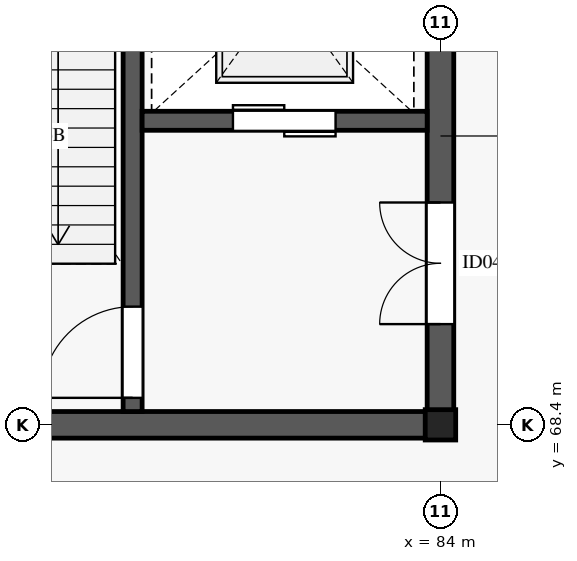
"""IFC4 building model, lengths in metres.
Left out: names, types, materials, properties, quantities, classifications, styles, units other than length and angle.
Written with IfcOpenShell. Run it as: python <this file> out.ifc"""

import sys

from ifc_helpers import new_model, si_unit, direction, frame, frame_2d, origin, origin_2d, place, context, subcontext, project, spatial, rectangle, i_section, extrude, element, fill, save


model = new_model("IFC4")
c1 = context("Model", 3, precision=1e-05, world=origin(), true_north=direction((0.0, 1.0)))
c2 = subcontext(c1, "Body", "Model", "MODEL_VIEW")
j1 = project(units=[si_unit("LENGTHUNIT", "METRE"), si_unit("PLANEANGLEUNIT", "RADIAN")], contexts=[c1])
p1 = place(None, origin())
s1 = spatial("IfcSite", under=j1, at=p1, CompositionType="ELEMENT")
p2 = place(p1, origin())
s2 = spatial("IfcBuilding", under=s1, at=p2, CompositionType="ELEMENT")
p3 = place(p2, origin())
s3 = spatial("IfcBuildingStorey", under=s2, at=p3, CompositionType="ELEMENT", Elevation=0.0)
p4 = place(p3, frame((84.0, 68.4, 0.0), z_axis=(0.0, 0.0, 1.0), x_axis=(1.0, 0.0, 0.0)))
e1 = element("IfcColumn", 1, at=p4, inside=s3, PredefinedType="COLUMN", context=c2, shape_type="SweptSolid", body=[
    extrude(i_section(OverallWidth=0.401, OverallDepth=0.399, WebThickness=0.025, FlangeThickness=0.04, FilletRadius=0.015, at=origin_2d()), origin(), (0.0, 0.0, 1.0), 5.185),
])
p5 = place(p3, frame((75.825, 68.4, 0.0), z_axis=(0.0, 0.0, 1.0), x_axis=(1.0, 0.0, 0.0)))
e2 = element("IfcWall", 2, at=p5, inside=s3, PredefinedType="SHEAR", context=c2, shape_type="SweptSolid", body=[
    extrude(rectangle(XDim=8.35, YDim=0.35, at=frame_2d((4.175, 0.0))), origin(), (0.0, 0.0, 1.0), 5.19),
])
p6 = place(p3, frame((84.0, 68.575, 0.0), z_axis=(0.0, 0.0, 1.0), x_axis=(0.0, 1.0, 0.0)))
e3 = element("IfcWall", 3, at=p6, inside=s3, PredefinedType="SHEAR", context=c2, shape_type="SweptSolid", body=[
    extrude(rectangle(XDim=7.25, YDim=0.35, at=frame_2d((3.625, 0.0))), origin(), (0.0, 0.0, 1.0), 5.19),
])
p7 = place(p6, frame((1.15, 0.0, 0.0)))
e4 = element("IfcOpeningElement", 4, at=p7, cuts=e3, PredefinedType="OPENING", context=c2, shape_type="SweptSolid", body=[
    extrude(rectangle(XDim=1.6, YDim=2.35, at=frame_2d((0.8, 1.175))), frame((0.0, 0.185, 0.0), z_axis=(0.0, -1.0, 0.0), x_axis=(1.0, 0.0, 0.0)), (0.0, 0.0, 1.0), 0.37),
])
p8 = place(p3, frame((79.95, 68.575, 0.0), z_axis=(0.0, 0.0, 1.0), x_axis=(0.0, 1.0, 0.0)))
e5 = element("IfcWall", 5, at=p8, inside=s3, PredefinedType="SHEAR", context=c2, shape_type="SweptSolid", body=[
    extrude(rectangle(XDim=7.25, YDim=0.25, at=frame_2d((3.625, 0.0))), origin(), (0.0, 0.0, 1.0), 5.19),
])
p9 = place(p8, frame((0.18, 0.0, 0.0)))
e6 = element("IfcOpeningElement", 6, at=p9, cuts=e5, PredefinedType="OPENING", context=c2, shape_type="SweptSolid", body=[
    extrude(rectangle(XDim=1.2, YDim=2.2, at=frame_2d((0.6, 1.1))), frame((0.0, 0.135, 0.0), z_axis=(0.0, -1.0, 0.0), x_axis=(1.0, 0.0, 0.0)), (0.0, 0.0, 1.0), 0.27),
])
p10 = place(p3, frame((80.075, 72.4, 0.0), z_axis=(0.0, 0.0, 1.0), x_axis=(1.0, 0.0, 0.0)))
e7 = element("IfcWall", 7, at=p10, inside=s3, PredefinedType="SHEAR", context=c2, shape_type="SweptSolid", body=[
    extrude(rectangle(XDim=3.75, YDim=0.25, at=frame_2d((1.875, 0.0))), origin(), (0.0, 0.0, 1.0), 5.19),
])
p11 = place(p10, frame((1.195, 0.0, 0.0)))
e8 = element("IfcOpeningElement", 8, at=p11, cuts=e7, PredefinedType="OPENING", context=c2, shape_type="SweptSolid", body=[
    extrude(rectangle(XDim=1.35, YDim=2.2, at=frame_2d((0.675, 1.1))), frame((0.0, 0.135, 0.0), z_axis=(0.0, -1.0, 0.0), x_axis=(1.0, 0.0, 0.0)), (0.0, 0.0, 1.0), 0.27),
])
p12 = place(p9, origin())
e9 = element("IfcDoor", 9, at=p12, inside=s3, OperationType="SINGLE_SWING_LEFT", PredefinedType="DOOR", context=c2, shape_type="SweptSolid", body=[
    extrude(rectangle(XDim=1.2, YDim=2.2, at=frame_2d((0.6, 1.1))), frame((0.0, 0.025, 0.0), z_axis=(0.0, -1.0, 0.0), x_axis=(1.0, 0.0, 0.0)), (0.0, 0.0, 1.0), 0.05),
])
fill(e6, e9)
p13 = place(p7, origin())
e10 = element("IfcDoor", 10, at=p13, inside=s3, OperationType="DOUBLE_DOOR_SINGLE_SWING", PredefinedType="DOOR", context=c2, shape_type="SweptSolid", body=[
    extrude(rectangle(XDim=1.6, YDim=2.35, at=frame_2d((0.8, 1.175))), frame((0.0, 0.025, 0.0), z_axis=(0.0, -1.0, 0.0), x_axis=(1.0, 0.0, 0.0)), (0.0, 0.0, 1.0), 0.05),
])
fill(e4, e10)
p14 = place(p11, origin())
e11 = element("IfcDoor", 11, at=p14, inside=s3, OperationType="DOUBLE_DOOR_SLIDING", PredefinedType="DOOR", context=c2, shape_type="SweptSolid", body=[
    extrude(rectangle(XDim=1.35, YDim=2.2, at=frame_2d((0.675, 1.1))), frame((0.0, 0.025, 0.0), z_axis=(0.0, -1.0, 0.0), x_axis=(1.0, 0.0, 0.0)), (0.0, 0.0, 1.0), 0.05),
])
fill(e8, e11)
save(model, sys.argv[1])
